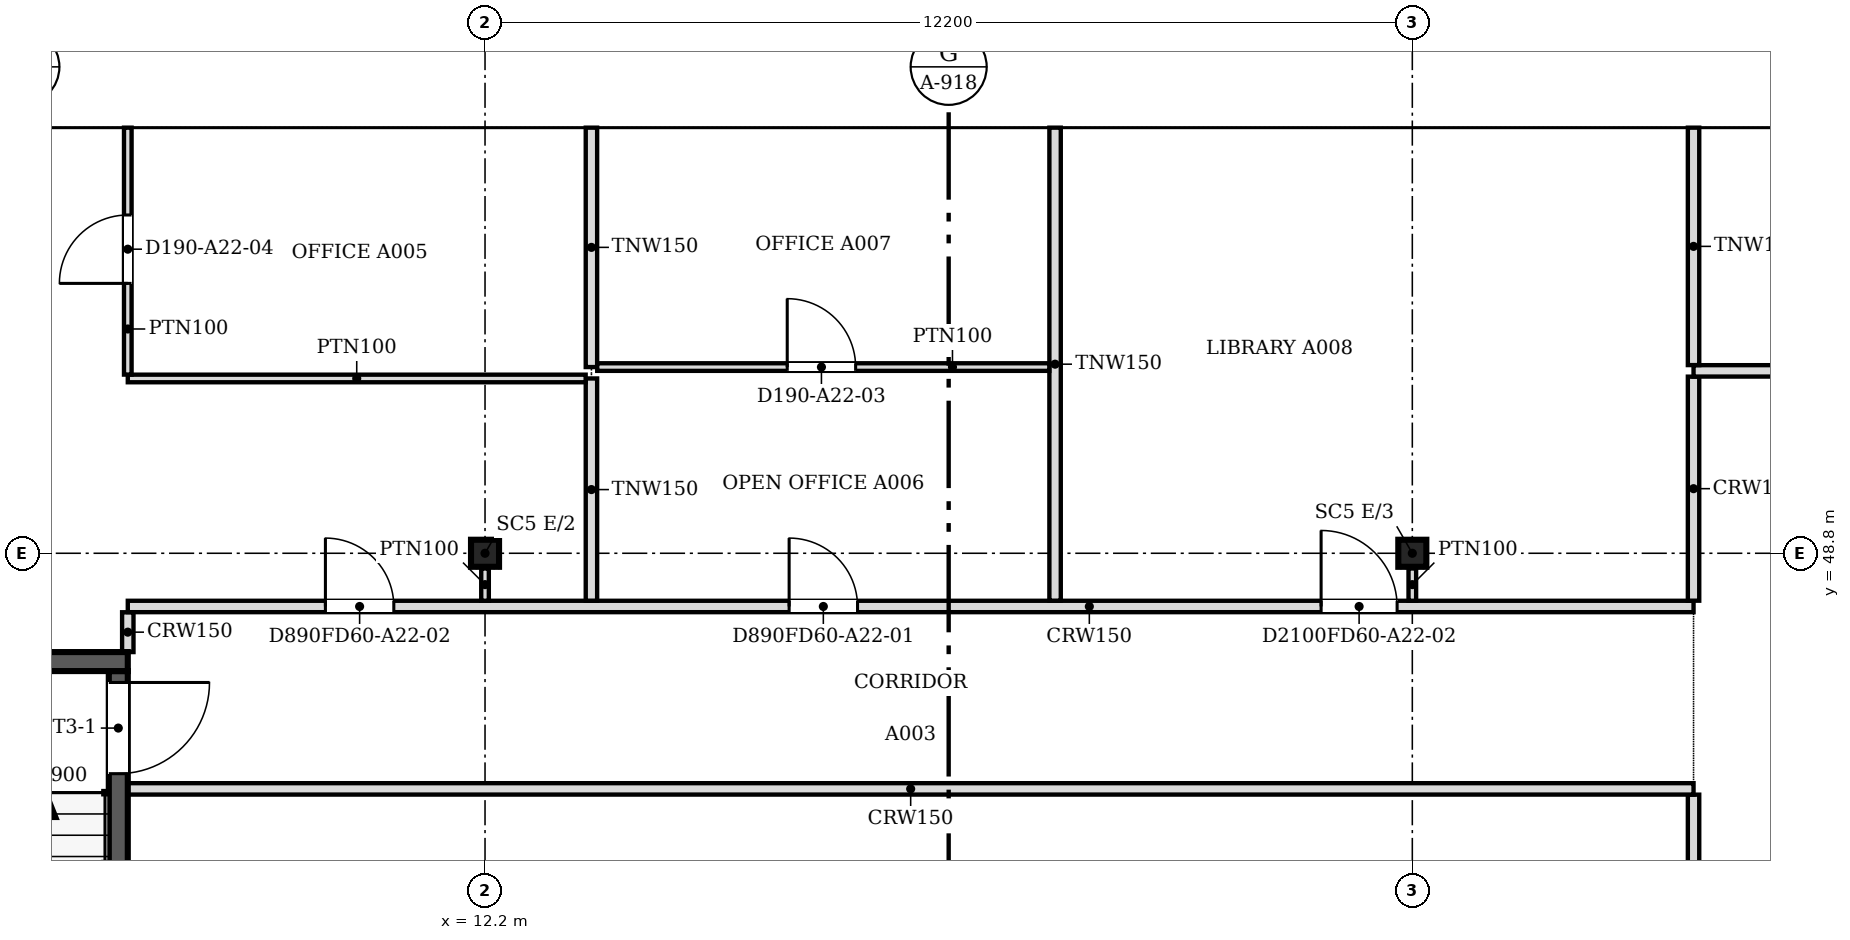
"""IFC4 building model, lengths in metres.
Left out: names, types, materials, properties, quantities, classifications, styles, units other than length and angle.
Written with IfcOpenShell. Run it as: python <this file> out.ifc"""

import sys

from ifc_helpers import new_model, si_unit, direction, frame, frame_2d, origin, origin_2d, place, context, subcontext, project, spatial, polyline, rectangle, i_section, outline, extrude, faceted_brep, source, transform, mapped, element, fill, save


model = new_model("IFC4")
c1 = context("Model", 3, precision=1e-05, world=origin(), true_north=direction((0.0, 1.0)))
c2 = subcontext(c1, "Body", "Model", "MODEL_VIEW")
j1 = project(units=[si_unit("LENGTHUNIT", "METRE"), si_unit("PLANEANGLEUNIT", "RADIAN")], contexts=[c1])
p1 = place(None, origin())
s1 = spatial("IfcSite", under=j1, at=p1, CompositionType="ELEMENT")
p2 = place(p1, origin())
s2 = spatial("IfcBuilding", under=s1, at=p2, CompositionType="ELEMENT")
p3 = place(p2, frame((0.0, 0.0, 255.9)))
s3 = spatial("IfcBuildingStorey", under=s2, at=p3, CompositionType="ELEMENT", Elevation=255.9)
for number, where, z_axis, x_axis in (
    (1, (12.2, 48.8, 0.0), (0.0, 0.0, 1.0), (1.0, 0.0, 0.0)),
    (2, (24.4, 48.8, 0.0), (0.0, 0.0, 1.0), (1.0, 0.0, 0.0)),
):
    element("IfcColumn", number, at=place(p3, frame(where, z_axis=z_axis, x_axis=x_axis)), inside=s3, PredefinedType="COLUMN", context=c2, shape_type="SweptSolid", body=[
        extrude(i_section(OverallWidth=0.369, OverallDepth=0.356, WebThickness=0.011, FlangeThickness=0.018, at=origin_2d()), origin(), (0.0, 0.0, 1.0), 3.55),
    ])
m1 = source(origin(), c2, "Body", "SweptSolid", [
    extrude(outline(polyline([(3.05, 0.0), (6.1, 3.8), (3.05, 7.6), (0.0, 3.8), (3.05, 0.0)])), frame((0.0, 0.25, 0.0), z_axis=(0.0, -1.0, 0.0), x_axis=(1.0, 0.0, 0.0)), (0.0, 0.0, 1.0), 0.5),
])
p4 = place(p3, frame((30.5, 54.65, -3.8), z_axis=(0.0, 0.0, 1.0), x_axis=(-1.0, 0.0, 0.0)))
e3 = element("IfcWall", 3, at=p4, inside=s3, PredefinedType="SOLIDWALL", context=c2, shape_type="MappedRepresentation", body=[
    mapped(m1, transform((0.0, 0.0, 0.0), scale=1.0)),
])
m2 = source(origin(), c2, "Body", "SweptSolid", [
    extrude(outline(polyline([(3.05, 0.399), (5.78, 3.8), (3.05, 7.2), (0.321, 3.8), (3.05, 0.399)])), frame((0.0, 0.26, 0.0), z_axis=(0.0, -1.0, 0.0), x_axis=(1.0, 0.0, 0.0)), (0.0, 0.0, 1.0), 0.52),
])
p5 = place(p4, origin())
e4 = element("IfcOpeningElement", 4, at=p5, cuts=e3, PredefinedType="OPENING", context=c2, shape_type="MappedRepresentation", body=[
    mapped(m2, transform((0.0, 0.0, 0.0), scale=1.0)),
])
m3 = source(origin(), c2, "Body", "Brep", [
    faceted_brep([(3.05, -0.25, 0.0), (6.1, -0.25, 3.8), (6.1, -0.25, 3.8), (3.05, -0.25, 7.6), (0.0, -0.25, 3.8), (0.0, 0.25, 3.8), (3.05, 0.25, 7.6), (6.1, 0.25, 3.8), (6.1, 0.25, 3.8), (3.05, 0.25, 0.0)], [[[0, 1, 2, 3, 4]], [[5, 6, 7, 8, 9]], [[9, 8, 1, 0]], [[7, 6, 3, 2]], [[6, 5, 4, 3]], [[5, 9, 0, 4]], [[1, 8, 7, 2]]]),
])
p6 = place(p3, frame((24.4, 54.65, -3.8), z_axis=(0.0, 0.0, 1.0), x_axis=(-1.0, 0.0, 0.0)))
e5 = element("IfcWall", 5, at=p6, inside=s3, PredefinedType="SOLIDWALL", context=c2, shape_type="MappedRepresentation", body=[
    mapped(m3, transform((0.0, 0.0, 0.0), scale=1.0)),
])
p7 = place(p6, origin())
e6 = element("IfcOpeningElement", 6, at=p7, cuts=e5, PredefinedType="OPENING", context=c2, shape_type="MappedRepresentation", body=[
    mapped(m2, transform((0.0, 0.0, 0.0), scale=1.0)),
])
p8 = place(p3, frame((18.3, 54.65, -3.8), z_axis=(0.0, 0.0, 1.0), x_axis=(-1.0, 0.0, 0.0)))
e7 = element("IfcWall", 7, at=p8, inside=s3, PredefinedType="SOLIDWALL", context=c2, shape_type="MappedRepresentation", body=[
    mapped(m1, transform((0.0, 0.0, 0.0), scale=1.0)),
])
p9 = place(p8, origin())
e8 = element("IfcOpeningElement", 8, at=p9, cuts=e7, PredefinedType="OPENING", context=c2, shape_type="MappedRepresentation", body=[
    mapped(m2, transform((0.0, 0.0, 0.0), scale=1.0)),
])
m4 = source(origin(), c2, "Body", "Brep", [
    faceted_brep([(3.05, -0.25, 0.0), (6.053, -0.25, 3.8), (3.05, -0.25, 7.6), (0.0, -0.25, 3.8), (0.0, 0.25, 3.8), (3.05, 0.25, 7.6), (6.007, 0.25, 3.859), (6.007, 0.25, 3.741), (3.05, 0.25, 0.0), (6.053, 0.0, 3.8)], [[[0, 1, 2, 3]], [[4, 5, 6, 7, 8]], [[8, 7, 9, 1, 0]], [[6, 5, 2, 1, 9]], [[5, 4, 3, 2]], [[4, 8, 0, 3]], [[9, 7, 6]]]),
])
p10 = place(p3, frame((12.2, 54.65, -3.8), z_axis=(0.0, 0.0, 1.0), x_axis=(-1.0, 0.0, 0.0)))
e9 = element("IfcWall", 9, at=p10, inside=s3, PredefinedType="SOLIDWALL", context=c2, shape_type="MappedRepresentation", body=[
    mapped(m4, transform((0.0, 0.0, 0.0), scale=1.0)),
])
m5 = source(origin(), c2, "Body", "SweptSolid", [
    extrude(outline(polyline([(3.049, 0.401), (5.735, 3.8), (3.049, 7.199), (0.321, 3.8), (3.049, 0.401)])), frame((0.0, 0.26, 0.0), z_axis=(0.0, -1.0, 0.0), x_axis=(1.0, 0.0, 0.0)), (0.0, 0.0, 1.0), 0.52),
])
p11 = place(p10, origin())
e10 = element("IfcOpeningElement", 10, at=p11, cuts=e9, PredefinedType="OPENING", context=c2, shape_type="MappedRepresentation", body=[
    mapped(m5, transform((0.0, 0.0, 0.0), scale=1.0)),
])
m6 = source(origin(), c2, "Body", "SweptSolid", [
    extrude(outline(polyline([(3.05, 0.0), (6.1, 3.8), (0.0, 3.8), (3.05, 0.0)])), frame((0.0, 0.25, 0.0), z_axis=(0.0, -1.0, 0.0), x_axis=(1.0, 0.0, 0.0)), (0.0, 0.0, 1.0), 0.5),
])
p12 = place(p3, frame((33.55, 54.65, 0.0), z_axis=(0.0, 0.0, 1.0), x_axis=(-1.0, 0.0, 0.0)))
e11 = element("IfcWall", 11, at=p12, inside=s3, PredefinedType="SOLIDWALL", context=c2, shape_type="MappedRepresentation", body=[
    mapped(m6, transform((0.0, 0.0, 0.0), scale=1.0)),
])
m7 = source(origin(), c2, "Body", "SweptSolid", [
    extrude(outline(polyline([(3.05, 0.399), (5.579, 3.55), (0.521, 3.55), (3.05, 0.399)])), frame((0.0, 0.26, 0.0), z_axis=(0.0, -1.0, 0.0), x_axis=(1.0, 0.0, 0.0)), (0.0, 0.0, 1.0), 0.52),
])
p13 = place(p12, origin())
e12 = element("IfcOpeningElement", 12, at=p13, cuts=e11, PredefinedType="OPENING", context=c2, shape_type="MappedRepresentation", body=[
    mapped(m7, transform((0.0, 0.0, 0.0), scale=1.0)),
])
m8 = source(origin(), c2, "Body", "Brep", [
    faceted_brep([(3.05, -0.25, 0.0), (6.1, -0.25, 3.8), (6.1, -0.25, 3.8), (0.0, -0.25, 3.8), (0.0, 0.25, 3.8), (6.1, 0.25, 3.8), (6.1, 0.25, 3.8), (3.05, 0.25, 0.0)], [[[0, 1, 2, 3]], [[4, 5, 6, 7]], [[7, 6, 1, 0]], [[5, 4, 3, 2]], [[4, 7, 0, 3]], [[1, 6, 5, 2]]]),
])
p14 = place(p3, frame((27.45, 54.65, 0.0), z_axis=(0.0, 0.0, 1.0), x_axis=(-1.0, 0.0, 0.0)))
e13 = element("IfcWall", 13, at=p14, inside=s3, PredefinedType="SOLIDWALL", context=c2, shape_type="MappedRepresentation", body=[
    mapped(m8, transform((0.0, 0.0, 0.0), scale=1.0)),
])
p15 = place(p14, origin())
e14 = element("IfcOpeningElement", 14, at=p15, cuts=e13, PredefinedType="OPENING", context=c2, shape_type="MappedRepresentation", body=[
    mapped(m7, transform((0.0, 0.0, 0.0), scale=1.0)),
])
p16 = place(p3, frame((21.35, 54.65, 0.0), z_axis=(0.0, 0.0, 1.0), x_axis=(-1.0, 0.0, 0.0)))
e15 = element("IfcWall", 15, at=p16, inside=s3, PredefinedType="SOLIDWALL", context=c2, shape_type="MappedRepresentation", body=[
    mapped(m6, transform((0.0, 0.0, 0.0), scale=1.0)),
])
p17 = place(p16, origin())
e16 = element("IfcOpeningElement", 16, at=p17, cuts=e15, PredefinedType="OPENING", context=c2, shape_type="MappedRepresentation", body=[
    mapped(m7, transform((0.0, 0.0, 0.0), scale=1.0)),
])
p18 = place(p3, frame((15.25, 54.65, 0.0), z_axis=(0.0, 0.0, 1.0), x_axis=(-1.0, 0.0, 0.0)))
e17 = element("IfcWall", 17, at=p18, inside=s3, PredefinedType="SOLIDWALL", context=c2, shape_type="MappedRepresentation", body=[
    mapped(m6, transform((0.0, 0.0, 0.0), scale=1.0)),
])
p19 = place(p18, origin())
e18 = element("IfcOpeningElement", 18, at=p19, cuts=e17, PredefinedType="OPENING", context=c2, shape_type="MappedRepresentation", body=[
    mapped(m7, transform((0.0, 0.0, 0.0), scale=1.0)),
])
m9 = source(origin(), c2, "Body", "Brep", [
    faceted_brep([(3.003, -0.25, 0.0), (3.05, -0.25, 0.06), (3.05, -0.25, 3.8), (0.0, -0.25, 3.8), (0.0, 0.25, 3.8), (2.957, 0.25, 3.8), (2.957, 0.25, 0.059), (3.003, 0.0, 0.0)], [[[0, 1, 2, 3]], [[4, 5, 6]], [[1, 0, 7]], [[5, 4, 3, 2]], [[4, 6, 7, 0, 3]], [[1, 7, 6, 5, 2]]]),
])
p20 = place(p3, frame((9.15, 54.65, 0.0), z_axis=(0.0, 0.0, 1.0), x_axis=(-1.0, 0.0, 0.0)))
e19 = element("IfcWall", 19, at=p20, inside=s3, PredefinedType="SOLIDWALL", context=c2, shape_type="MappedRepresentation", body=[
    mapped(m9, transform((0.0, 0.0, 0.0), scale=1.0)),
])
m10 = source(origin(), c2, "Body", "SweptSolid", [
    extrude(outline(polyline([(2.803, 3.55), (0.516, 3.55), (2.803, 0.656), (2.803, 3.55)])), frame((0.0, 0.26, 0.0), z_axis=(0.0, -1.0, 0.0), x_axis=(1.0, 0.0, 0.0)), (0.0, 0.0, 1.0), 0.52),
])
p21 = place(p20, origin())
e20 = element("IfcOpeningElement", 20, at=p21, cuts=e19, PredefinedType="OPENING", context=c2, shape_type="MappedRepresentation", body=[
    mapped(m10, transform((0.0, 0.0, 0.0), scale=1.0)),
])
p22 = place(p3, frame((3.6, 47.375, 0.0), z_axis=(0.0, 0.0, 1.0), x_axis=(1.0, 0.0, 0.0)))
e21 = element("IfcWall", 21, at=p22, inside=s3, PredefinedType="SOLIDWALL", context=c2, shape_type="SweptSolid", body=[
    extrude(rectangle(XDim=3.9, YDim=0.25, at=frame_2d((1.95, 0.0))), origin(), (0.0, 0.0, 1.0), 3.8),
])
p23 = place(p3, frame((7.375, 47.25, 0.0), z_axis=(0.0, 0.0, 1.0), x_axis=(0.0, -1.0, 0.0)))
e22 = element("IfcWall", 22, at=p23, inside=s3, PredefinedType="SOLIDWALL", context=c2, shape_type="SweptSolid", body=[
    extrude(rectangle(XDim=8.0, YDim=0.25, at=frame_2d((4.0, 0.0))), origin(), (0.0, 0.0, 1.0), 3.8),
])
m11 = source(origin(), c2, "Body", "SweptSolid", [
    extrude(rectangle(XDim=1.2, YDim=2.1, at=frame_2d((0.6, 1.05))), frame((0.0, 0.135, 0.0), z_axis=(0.0, -1.0, 0.0), x_axis=(1.0, 0.0, 0.0)), (0.0, 0.0, 1.0), 0.27),
])
p24 = place(p23, frame((0.15, 0.0, 0.0)))
e23 = element("IfcOpeningElement", 23, at=p24, cuts=e22, PredefinedType="OPENING", context=c2, shape_type="MappedRepresentation", body=[
    mapped(m11, transform((0.0, 0.0, 0.0), scale=1.0)),
])
p25 = place(p3, frame((28.1, 22.076, 0.0), z_axis=(0.0, 0.0, 1.0), x_axis=(0.0, 1.0, 0.0)))
e24 = element("IfcWall", 24, at=p25, inside=s3, PredefinedType="PARTITIONING", context=c2, shape_type="SweptSolid", body=[
    extrude(rectangle(XDim=23.548, YDim=0.15, at=frame_2d((11.774, 0.0))), origin(), (0.0, 0.0, 1.0), 2.947),
])
m12 = source(origin(), c2, "Body", "SweptSolid", [
    extrude(rectangle(XDim=1.0, YDim=2.1, at=frame_2d((0.5, 1.05))), frame((0.0, 0.085, 0.0), z_axis=(0.0, -1.0, 0.0), x_axis=(1.0, 0.0, 0.0)), (0.0, 0.0, 1.0), 0.17),
])
p26 = place(p25, frame((2.5, 0.0, 0.0)))
e25 = element("IfcOpeningElement", 25, at=p26, cuts=e24, PredefinedType="OPENING", context=c2, shape_type="MappedRepresentation", body=[
    mapped(m12, transform((0.0, 0.0, 0.0), scale=1.0)),
])
m13 = source(origin(), c2, "Body", "SweptSolid", [
    extrude(rectangle(XDim=0.9, YDim=2.1, at=frame_2d((0.45, 1.05))), frame((0.0, 0.085, 0.0), z_axis=(0.0, -1.0, 0.0), x_axis=(1.0, 0.0, 0.0)), (0.0, 0.0, 1.0), 0.17),
])
p27 = place(p25, frame((18.875, 0.0, 0.0)))
e26 = element("IfcOpeningElement", 26, at=p27, cuts=e24, PredefinedType="OPENING", context=c2, shape_type="MappedRepresentation", body=[
    mapped(m13, transform((0.0, 0.0, 0.0), scale=1.0)),
])
p28 = place(p25, frame((10.124, 0.0, 0.0)))
e27 = element("IfcOpeningElement", 27, at=p28, cuts=e24, PredefinedType="OPENING", context=c2, shape_type="MappedRepresentation", body=[
    mapped(m13, transform((0.0, 0.0, 0.0), scale=1.0)),
])
p29 = place(p3, frame((7.5, 45.7, 0.0), z_axis=(0.0, 0.0, 1.0), x_axis=(1.0, 0.0, 0.0)))
e28 = element("IfcWall", 28, at=p29, inside=s3, PredefinedType="PARTITIONING", context=c2, shape_type="SweptSolid", body=[
    extrude(rectangle(XDim=20.6, YDim=0.15, at=frame_2d((10.3, 0.0))), origin(), (0.0, 0.0, 1.0), 2.947),
])
p30 = place(p3, frame((7.5, 47.5, 0.0), z_axis=(0.0, 0.0, 1.0), x_axis=(0.0, 1.0, 0.0)))
e29 = element("IfcWall", 29, at=p30, inside=s3, PredefinedType="PARTITIONING", context=c2, shape_type="SweptSolid", body=[
    extrude(rectangle(XDim=0.524, YDim=0.15, at=frame_2d((0.262, 0.0))), origin(), (0.0, 0.0, 1.0), 2.947),
])
p31 = place(p3, frame((7.5, 48.1, 0.0), z_axis=(0.0, 0.0, 1.0), x_axis=(1.0, 0.0, 0.0)))
e30 = element("IfcWall", 30, at=p31, inside=s3, PredefinedType="PARTITIONING", context=c2, shape_type="SweptSolid", body=[
    extrude(rectangle(XDim=20.6, YDim=0.15, at=frame_2d((10.3, 0.0))), origin(), (0.0, 0.0, 1.0), 2.947),
])
p32 = place(p31, frame((8.701, 0.0, 0.0)))
e31 = element("IfcOpeningElement", 31, at=p32, cuts=e30, PredefinedType="OPENING", context=c2, shape_type="MappedRepresentation", body=[
    mapped(m13, transform((0.0, 0.0, 0.0), scale=1.0)),
])
p33 = place(p31, frame((2.6, 0.0, 0.0)))
e32 = element("IfcOpeningElement", 32, at=p33, cuts=e30, PredefinedType="OPENING", context=c2, shape_type="MappedRepresentation", body=[
    mapped(m13, transform((0.0, 0.0, 0.0), scale=1.0)),
])
p34 = place(p31, frame((15.7, 0.0, 0.0)))
e33 = element("IfcOpeningElement", 33, at=p34, cuts=e30, PredefinedType="OPENING", context=c2, shape_type="MappedRepresentation", body=[
    mapped(m12, transform((0.0, 0.0, 0.0), scale=1.0)),
])
p35 = place(p3, frame((13.6, 48.176, 0.0), z_axis=(0.0, 0.0, 1.0), x_axis=(0.0, 1.0, 0.0)))
e34 = element("IfcWall", 34, at=p35, inside=s3, PredefinedType="PARTITIONING", context=c2, shape_type="SweptSolid", body=[
    extrude(rectangle(XDim=2.924, YDim=0.15, at=frame_2d((1.462, 0.0))), origin(), (0.0, 0.0, 1.0), 2.947),
])
p36 = place(p3, frame((19.7, 48.176, 0.0), z_axis=(0.0, 0.0, 1.0), x_axis=(0.0, 1.0, 0.0)))
e35 = element("IfcWall", 35, at=p36, inside=s3, PredefinedType="PARTITIONING", context=c2, shape_type="SweptSolid", body=[
    extrude(rectangle(XDim=6.224, YDim=0.15, at=frame_2d((3.112, 0.0))), origin(), (0.0, 0.0, 1.0), 2.947),
])
p37 = place(p3, frame((28.1, 48.176, 0.0), z_axis=(0.0, 0.0, 1.0), x_axis=(0.0, 1.0, 0.0)))
e36 = element("IfcWall", 36, at=p37, inside=s3, PredefinedType="PARTITIONING", context=c2, shape_type="SweptSolid", body=[
    extrude(rectangle(XDim=2.948, YDim=0.15, at=frame_2d((1.474, 0.0))), origin(), (0.0, 0.0, 1.0), 2.947),
])
for number, where, z_axis, x_axis in (
    (37, (12.2, 48.6, 0.0), (0.0, 0.0, 1.0), (0.0, -1.0, 0.0)),
    (38, (24.4, 48.6, 0.0), (0.0, 0.0, 1.0), (0.0, -1.0, 0.0)),
):
    element("IfcWall", number, at=place(p3, frame(where, z_axis=z_axis, x_axis=x_axis)), inside=s3, PredefinedType="PARTITIONING", context=c2, shape_type="SweptSolid", body=[
        extrude(rectangle(XDim=0.425, YDim=0.1, at=frame_2d((0.212, 0.0))), origin(), (0.0, 0.0, 1.0), 2.947),
    ])
p38 = place(p3, frame((7.5, 51.1, 0.0), z_axis=(0.0, 0.0, 1.0), x_axis=(1.0, 0.0, 0.0)))
e39 = element("IfcWall", 39, at=p38, inside=s3, PredefinedType="PARTITIONING", context=c2, shape_type="SweptSolid", body=[
    extrude(rectangle(XDim=6.024, YDim=0.1, at=frame_2d((3.012, 0.0))), origin(), (0.0, 0.0, 1.0), 2.947),
])
p39 = place(p3, frame((7.5, 54.4, 0.0), z_axis=(0.0, 0.0, 1.0), x_axis=(0.0, -1.0, 0.0)))
e40 = element("IfcWall", 40, at=p39, inside=s3, PredefinedType="PARTITIONING", context=c2, shape_type="SweptSolid", body=[
    extrude(rectangle(XDim=3.249, YDim=0.1, at=frame_2d((1.625, 0.0))), origin(), (0.0, 0.0, 1.0), 2.947),
])
m14 = source(origin(), c2, "Body", "SweptSolid", [
    extrude(rectangle(XDim=0.9, YDim=2.1, at=frame_2d((0.45, 1.05))), frame((0.0, 0.06, 0.0), z_axis=(0.0, -1.0, 0.0), x_axis=(1.0, 0.0, 0.0)), (0.0, 0.0, 1.0), 0.12),
])
p40 = place(p39, frame((1.149, 0.0, 0.0)))
e41 = element("IfcOpeningElement", 41, at=p40, cuts=e40, PredefinedType="OPENING", context=c2, shape_type="MappedRepresentation", body=[
    mapped(m14, transform((0.0, 0.0, 0.0), scale=1.0)),
])
p41 = place(p3, frame((28.1, 51.2, 0.0), z_axis=(0.0, 0.0, 1.0), x_axis=(1.0, 0.0, 0.0)))
e42 = element("IfcWall", 42, at=p41, inside=s3, PredefinedType="PARTITIONING", context=c2, shape_type="SweptSolid", body=[
    extrude(rectangle(XDim=31.438, YDim=0.15, at=frame_2d((15.719, 0.0))), origin(), (0.0, 0.0, 1.0), 2.947),
])
p42 = place(p41, frame((5.6, 0.0, 0.0)))
e43 = element("IfcOpeningElement", 43, at=p42, cuts=e42, PredefinedType="OPENING", context=c2, shape_type="MappedRepresentation", body=[
    mapped(m13, transform((0.0, 0.0, 0.0), scale=1.0)),
])
p43 = place(p41, frame((21.4, 0.0, 0.0)))
e44 = element("IfcOpeningElement", 44, at=p43, cuts=e42, PredefinedType="OPENING", context=c2, shape_type="MappedRepresentation", body=[
    mapped(m13, transform((0.0, 0.0, 0.0), scale=1.0)),
])
p44 = place(p3, frame((13.6, 51.25, 0.0), z_axis=(0.0, 0.0, 1.0), x_axis=(0.0, 1.0, 0.0)))
e45 = element("IfcWall", 45, at=p44, inside=s3, PredefinedType="PARTITIONING", context=c2, shape_type="SweptSolid", body=[
    extrude(rectangle(XDim=3.15, YDim=0.15, at=frame_2d((1.575, 0.0))), origin(), (0.0, 0.0, 1.0), 2.947),
])
p45 = place(p3, frame((13.676, 51.25, 0.0), z_axis=(0.0, 0.0, 1.0), x_axis=(1.0, 0.0, 0.0)))
e46 = element("IfcWall", 46, at=p45, inside=s3, PredefinedType="PARTITIONING", context=c2, shape_type="SweptSolid", body=[
    extrude(rectangle(XDim=5.948, YDim=0.1, at=frame_2d((2.974, 0.0))), origin(), (0.0, 0.0, 1.0), 2.947),
])
p46 = place(p45, frame((2.5, 0.0, 0.0)))
e47 = element("IfcOpeningElement", 47, at=p46, cuts=e46, PredefinedType="OPENING", context=c2, shape_type="MappedRepresentation", body=[
    mapped(m14, transform((0.0, 0.0, 0.0), scale=1.0)),
])
p47 = place(p3, frame((28.1, 51.276, 0.0), z_axis=(0.0, 0.0, 1.0), x_axis=(0.0, 1.0, 0.0)))
e48 = element("IfcWall", 48, at=p47, inside=s3, PredefinedType="PARTITIONING", context=c2, shape_type="SweptSolid", body=[
    extrude(rectangle(XDim=3.124, YDim=0.15, at=frame_2d((1.562, 0.0))), origin(), (0.0, 0.0, 1.0), 2.947),
])
m15 = source(origin(), c2, "Body", "SweptSolid", [
    extrude(rectangle(XDim=1.2, YDim=2.1, at=frame_2d((0.6, 1.05))), frame((0.0, 0.025, 0.0), z_axis=(0.0, -1.0, 0.0), x_axis=(1.0, 0.0, 0.0)), (0.0, 0.0, 1.0), 0.05),
])
p48 = place(p24, origin())
e49 = element("IfcDoor", 49, at=p48, inside=s3, OperationType="SINGLE_SWING_LEFT", PredefinedType="DOOR", context=c2, shape_type="MappedRepresentation", body=[
    mapped(m15, transform((0.0, 0.0, 0.0), scale=1.0)),
])
fill(e23, e49)
m16 = source(origin(), c2, "Body", "SweptSolid", [
    extrude(rectangle(XDim=0.9, YDim=2.1, at=frame_2d((0.45, 1.05))), frame((0.0, 0.025, 0.0), z_axis=(0.0, -1.0, 0.0), x_axis=(1.0, 0.0, 0.0)), (0.0, 0.0, 1.0), 0.05),
])
p49 = place(p46, origin())
e50 = element("IfcDoor", 50, at=p49, inside=s3, OperationType="SINGLE_SWING_LEFT", PredefinedType="DOOR", context=c2, shape_type="MappedRepresentation", body=[
    mapped(m16, transform((0.0, 0.0, 0.0), scale=1.0)),
])
fill(e47, e50)
p50 = place(p32, origin())
e51 = element("IfcDoor", 51, at=p50, inside=s3, OperationType="SINGLE_SWING_LEFT", PredefinedType="DOOR", context=c2, shape_type="MappedRepresentation", body=[
    mapped(m16, transform((0.0, 0.0, 0.0), scale=1.0)),
])
fill(e31, e51)
p51 = place(p33, origin())
e52 = element("IfcDoor", 52, at=p51, inside=s3, OperationType="SINGLE_SWING_LEFT", PredefinedType="DOOR", context=c2, shape_type="MappedRepresentation", body=[
    mapped(m16, transform((0.0, 0.0, 0.0), scale=1.0)),
])
fill(e32, e52)
m17 = source(origin(), c2, "Body", "SweptSolid", [
    extrude(rectangle(XDim=1.0, YDim=2.1, at=frame_2d((0.5, 1.05))), frame((0.0, 0.025, 0.0), z_axis=(0.0, -1.0, 0.0), x_axis=(1.0, 0.0, 0.0)), (0.0, 0.0, 1.0), 0.05),
])
p52 = place(p34, origin())
e53 = element("IfcDoor", 53, at=p52, inside=s3, OperationType="SINGLE_SWING_LEFT", PredefinedType="DOOR", context=c2, shape_type="MappedRepresentation", body=[
    mapped(m17, transform((0.0, 0.0, 0.0), scale=1.0)),
])
fill(e33, e53)
p53 = place(p40, origin())
e54 = element("IfcDoor", 54, at=p53, inside=s3, OperationType="SINGLE_SWING_RIGHT", PredefinedType="DOOR", context=c2, shape_type="MappedRepresentation", body=[
    mapped(m16, transform((0.0, 0.0, 0.0), scale=1.0)),
])
fill(e41, e54)
save(model, sys.argv[1])
